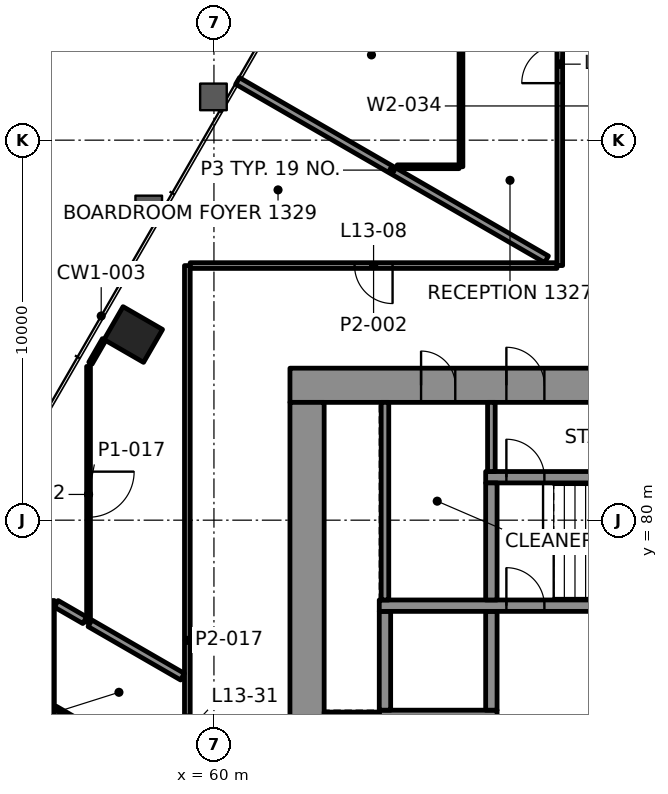
"""IFC4 building model, lengths in metres.
Left out: names, types, materials, properties, quantities, classifications, styles, units other than length and angle.
Written with IfcOpenShell. Run it as: python <this file> out.ifc"""

import sys

from ifc_helpers import new_model, si_unit, direction, frame, frame_2d, origin, origin_2d, place, context, subcontext, project, spatial, rectangle, extrude, element, fill, save


model = new_model("IFC4")
c1 = context("Model", 3, precision=1e-05, world=origin(), true_north=direction((0.0, 1.0)))
c2 = subcontext(c1, "Body", "Model", "MODEL_VIEW")
j1 = project(units=[si_unit("LENGTHUNIT", "METRE"), si_unit("PLANEANGLEUNIT", "RADIAN")], contexts=[c1])
p1 = place(None, origin())
s1 = spatial("IfcSite", under=j1, at=p1, CompositionType="ELEMENT")
p2 = place(p1, origin())
s2 = spatial("IfcBuilding", under=s1, at=p2, CompositionType="ELEMENT")
p3 = place(p2, frame((0.0, 0.0, 61.0)))
s3 = spatial("IfcBuildingStorey", under=s2, at=p3, CompositionType="ELEMENT", Elevation=61.0)
p4 = place(p3, frame((57.878, 84.885, -0.0), z_axis=(0.0, 0.0, 1.0), x_axis=(-0.5, -0.866025403784, 0.0)))
e1 = element("IfcColumn", 1, at=p4, inside=s3, PredefinedType="COLUMN", context=c2, shape_type="SweptSolid", body=[
    extrude(rectangle(XDim=1.0, YDim=1.2, at=origin_2d()), origin(), (0.0, 0.0, 1.0), 4.2),
])
p5 = place(p3, frame((62.0, 83.55, 0.0), z_axis=(0.0, 0.0, 1.0), x_axis=(1.0, 0.0, 0.0)))
e2 = element("IfcWall", 2, at=p5, inside=s3, PredefinedType="SHEAR", context=c2, shape_type="SweptSolid", body=[
    extrude(rectangle(XDim=26.0, YDim=0.9, at=frame_2d((13.0, 0.0))), origin(), (0.0, 0.0, 1.0), 4.0),
])
p6 = place(p5, frame((5.695, 0.0, 0.0)))
e3 = element("IfcOpeningElement", 3, at=p6, cuts=e2, PredefinedType="OPENING", context=c2, shape_type="SweptSolid", body=[
    extrude(rectangle(XDim=1.0, YDim=2.1, at=frame_2d((0.5, 1.05))), frame((0.0, 0.46, 0.0), z_axis=(0.0, -1.0, 0.0), x_axis=(1.0, 0.0, 0.0)), (0.0, 0.0, 1.0), 0.92),
])
p7 = place(p5, frame((19.505, 0.0, 0.0)))
e4 = element("IfcOpeningElement", 4, at=p7, cuts=e2, PredefinedType="OPENING", context=c2, shape_type="SweptSolid", body=[
    extrude(rectangle(XDim=1.0, YDim=2.1, at=frame_2d((0.5, 1.05))), frame((0.0, 0.46, 0.0), z_axis=(0.0, -1.0, 0.0), x_axis=(1.0, 0.0, 0.0)), (0.0, 0.0, 1.0), 0.92),
])
p8 = place(p5, frame((3.45, 0.0, 0.0)))
e5 = element("IfcOpeningElement", 5, at=p8, cuts=e2, PredefinedType="OPENING", context=c2, shape_type="SweptSolid", body=[
    extrude(rectangle(XDim=0.9, YDim=2.1, at=frame_2d((0.45, 1.05))), frame((0.0, 0.46, 0.0), z_axis=(0.0, -1.0, 0.0), x_axis=(1.0, 0.0, 0.0)), (0.0, 0.0, 1.0), 0.92),
])
p9 = place(p5, frame((12.65, 0.0, 0.0)))
e6 = element("IfcOpeningElement", 6, at=p9, cuts=e2, PredefinedType="OPENING", context=c2, shape_type="SweptSolid", body=[
    extrude(rectangle(XDim=0.9, YDim=2.1, at=frame_2d((0.45, 1.05))), frame((0.0, 0.46, 0.0), z_axis=(0.0, -1.0, 0.0), x_axis=(1.0, 0.0, 0.0)), (0.0, 0.0, 1.0), 0.92),
])
p10 = place(p5, frame((22.55, 0.0, 0.0)))
e7 = element("IfcOpeningElement", 7, at=p10, cuts=e2, PredefinedType="OPENING", context=c2, shape_type="SweptSolid", body=[
    extrude(rectangle(XDim=0.9, YDim=2.1, at=frame_2d((0.45, 1.05))), frame((0.0, 0.46, 0.0), z_axis=(0.0, -1.0, 0.0), x_axis=(1.0, 0.0, 0.0)), (0.0, 0.0, 1.0), 0.92),
])
p11 = place(p3, frame((62.45, 66.9, 0.0), z_axis=(0.0, 0.0, 1.0), x_axis=(0.0, 1.0, 0.0)))
e8 = element("IfcWall", 8, at=p11, inside=s3, PredefinedType="SHEAR", context=c2, shape_type="SweptSolid", body=[
    extrude(rectangle(XDim=16.2, YDim=0.9, at=frame_2d((8.1, 0.0))), origin(), (0.0, 0.0, 1.0), 4.0),
])
p12 = place(p11, frame((5.5, 0.0, 0.0)))
e9 = element("IfcOpeningElement", 9, at=p12, cuts=e8, PredefinedType="OPENING", context=c2, shape_type="SweptSolid", body=[
    extrude(rectangle(XDim=1.8, YDim=2.1, at=frame_2d((0.9, 1.05))), frame((0.0, 0.46, 0.0), z_axis=(0.0, -1.0, 0.0), x_axis=(1.0, 0.0, 0.0)), (0.0, 0.0, 1.0), 0.92),
])
p13 = place(p3, frame((64.35, 74.85, 0.0), z_axis=(0.0, 0.0, 1.0), x_axis=(1.0, 0.0, 0.0)))
e10 = element("IfcWall", 10, at=p13, inside=s3, PredefinedType="SHEAR", context=c2, shape_type="SweptSolid", body=[
    extrude(rectangle(XDim=3.1, YDim=0.3, at=frame_2d((1.55, 0.0))), origin(), (0.0, 0.0, 1.0), 4.0),
])
for number, where, z_axis, x_axis in (
    (11, (64.5, 75.0, 0.0), (0.0, 0.0, 1.0), (0.0, 1.0, 0.0)),
    (12, (67.3, 75.0, 0.0), (0.0, 0.0, 1.0), (0.0, 1.0, 0.0)),
):
    element("IfcWall", number, at=place(p3, frame(where, z_axis=z_axis, x_axis=x_axis)), inside=s3, PredefinedType="SHEAR", context=c2, shape_type="SweptSolid", body=[
        extrude(rectangle(XDim=2.6, YDim=0.3, at=frame_2d((1.3, 0.0))), origin(), (0.0, 0.0, 1.0), 4.0),
    ])
p14 = place(p3, frame((64.35, 77.75, 0.0), z_axis=(0.0, 0.0, 1.0), x_axis=(1.0, 0.0, 0.0)))
e13 = element("IfcWall", 13, at=p14, inside=s3, PredefinedType="SHEAR", context=c2, shape_type="SweptSolid", body=[
    extrude(rectangle(XDim=22.75, YDim=0.3, at=frame_2d((11.375, 0.0))), origin(), (0.0, 0.0, 1.0), 4.0),
])
p15 = place(p14, frame((3.345, 0.0, 0.0)))
e14 = element("IfcOpeningElement", 14, at=p15, cuts=e13, PredefinedType="OPENING", context=c2, shape_type="SweptSolid", body=[
    extrude(rectangle(XDim=1.0, YDim=2.1, at=frame_2d((0.5, 1.05))), frame((0.0, 0.16, 0.0), z_axis=(0.0, -1.0, 0.0), x_axis=(1.0, 0.0, 0.0)), (0.0, 0.0, 1.0), 0.32),
])
p16 = place(p3, frame((67.15, 81.13, 0.0), z_axis=(0.0, 0.0, 1.0), x_axis=(1.0, 0.0, 0.0)))
e15 = element("IfcWall", 15, at=p16, inside=s3, PredefinedType="SHEAR", context=c2, shape_type="SweptSolid", body=[
    extrude(rectangle(XDim=6.91, YDim=0.3, at=frame_2d((3.455, 0.0))), origin(), (0.0, 0.0, 1.0), 4.0),
])
p17 = place(p16, frame((0.545, 0.0, 0.0)))
e16 = element("IfcOpeningElement", 16, at=p17, cuts=e15, PredefinedType="OPENING", context=c2, shape_type="SweptSolid", body=[
    extrude(rectangle(XDim=1.0, YDim=2.1, at=frame_2d((0.5, 1.05))), frame((0.0, 0.16, 0.0), z_axis=(0.0, -1.0, 0.0), x_axis=(1.0, 0.0, 0.0)), (0.0, 0.0, 1.0), 0.32),
])
p18 = place(p3, frame((67.3, 77.9, 0.0), z_axis=(0.0, 0.0, 1.0), x_axis=(0.0, 1.0, 0.0)))
e17 = element("IfcWall", 17, at=p18, inside=s3, PredefinedType="SHEAR", context=c2, shape_type="SweptSolid", body=[
    extrude(rectangle(XDim=3.08, YDim=0.3, at=frame_2d((1.54, 0.0))), origin(), (0.0, 0.0, 1.0), 4.0),
])
p19 = place(p3, frame((69.025, 86.7, 0.0), z_axis=(0.0, 0.0, 1.0), x_axis=(-1.0, 0.0, 0.0)))
e18 = element("IfcWall", 18, at=p19, inside=s3, PredefinedType="PARTITIONING", context=c2, shape_type="SweptSolid", body=[
    extrude(rectangle(XDim=9.649, YDim=0.15, at=frame_2d((4.825, 0.0))), origin(), (0.0, 0.0, 1.0), 3.4),
])
p20 = place(p19, frame((4.325, 0.0, 0.0)))
e19 = element("IfcOpeningElement", 19, at=p20, cuts=e18, PredefinedType="OPENING", context=c2, shape_type="SweptSolid", body=[
    extrude(rectangle(XDim=1.0, YDim=2.1, at=frame_2d((0.5, 1.05))), frame((0.0, 0.085, 0.0), z_axis=(0.0, -1.0, 0.0), x_axis=(1.0, 0.0, 0.0)), (0.0, 0.0, 1.0), 0.17),
])
p21 = place(p3, frame((64.823, 89.3, 0.0), z_axis=(0.0, 0.0, 1.0), x_axis=(1.0, 0.0, 0.0)))
e20 = element("IfcWall", 20, at=p21, inside=s3, PredefinedType="PARTITIONING", context=c2, shape_type="SweptSolid", body=[
    extrude(rectangle(XDim=1.627, YDim=0.1, at=frame_2d((0.813, 0.0))), origin(), (0.0, 0.0, 1.0), 3.4),
])
p22 = place(p3, frame((56.75, 84.132, 0.0), z_axis=(0.0, 0.0, 1.0), x_axis=(0.49987987985, 0.866094744079, 0.0)))
e21 = element("IfcWall", 21, at=p22, inside=s3, PredefinedType="PARTITIONING", context=c2, shape_type="SweptSolid", body=[
    extrude(rectangle(XDim=0.716, YDim=0.1, at=frame_2d((0.358, 0.0))), origin(), (0.0, 0.0, 1.0), 3.4),
])
p23 = place(p3, frame((69.1, 86.7, 0.0), z_axis=(0.0, 0.0, 1.0), x_axis=(0.0, 1.0, 0.0)))
e22 = element("IfcWall", 22, at=p23, inside=s3, PredefinedType="PARTITIONING", context=c2, shape_type="SweptSolid", body=[
    extrude(rectangle(XDim=10.6, YDim=0.15, at=frame_2d((5.3, 0.0))), origin(), (0.0, 0.0, 1.0), 3.4),
])
p24 = place(p23, frame((4.8, 0.0, 0.0)))
e23 = element("IfcOpeningElement", 23, at=p24, cuts=e22, PredefinedType="OPENING", context=c2, shape_type="SweptSolid", body=[
    extrude(rectangle(XDim=1.0, YDim=2.1, at=frame_2d((0.5, 1.05))), frame((0.0, 0.085, 0.0), z_axis=(0.0, -1.0, 0.0), x_axis=(1.0, 0.0, 0.0)), (0.0, 0.0, 1.0), 0.17),
])
p25 = place(p3, frame((66.5, 99.899, 0.0), z_axis=(0.0, 0.0, 1.0), x_axis=(0.0, -1.0, 0.0)))
e24 = element("IfcWall", 24, at=p25, inside=s3, PredefinedType="PARTITIONING", context=c2, shape_type="SweptSolid", body=[
    extrude(rectangle(XDim=10.599, YDim=0.1, at=frame_2d((5.3, 0.0))), origin(), (0.0, 0.0, 1.0), 3.165),
])
p26 = place(p25, frame((5.062, 0.0, 0.0)))
e25 = element("IfcOpeningElement", 25, at=p26, cuts=e24, PredefinedType="OPENING", context=c2, shape_type="SweptSolid", body=[
    extrude(rectangle(XDim=1.0, YDim=2.1, at=frame_2d((0.5, 1.05))), frame((0.0, 0.06, 0.0), z_axis=(0.0, -1.0, 0.0), x_axis=(1.0, 0.0, 0.0)), (0.0, 0.0, 1.0), 0.12),
])
p27 = place(p3, frame((59.3, 66.975, 0.0), z_axis=(0.0, 0.0, 1.0), x_axis=(0.0, 1.0, 0.0)))
e26 = element("IfcWall", 26, at=p27, inside=s3, PredefinedType="PARTITIONING", context=c2, shape_type="SweptSolid", body=[
    extrude(rectangle(XDim=19.725, YDim=0.15, at=frame_2d((9.862, 0.0))), origin(), (0.0, 0.0, 1.0), 3.4),
])
p28 = place(p27, frame((1.502, 0.0, 0.0)))
e27 = element("IfcOpeningElement", 27, at=p28, cuts=e26, PredefinedType="OPENING", context=c2, shape_type="SweptSolid", body=[
    extrude(rectangle(XDim=0.9, YDim=2.1, at=frame_2d((0.45, 1.05))), frame((0.0, 0.085, 0.0), z_axis=(0.0, -1.0, 0.0), x_axis=(1.0, 0.0, 0.0)), (0.0, 0.0, 1.0), 0.17),
])
p29 = place(p27, frame((4.254, 0.0, 0.0)))
e28 = element("IfcOpeningElement", 28, at=p29, cuts=e26, PredefinedType="OPENING", context=c2, shape_type="SweptSolid", body=[
    extrude(rectangle(XDim=0.9, YDim=2.1, at=frame_2d((0.45, 1.05))), frame((0.0, 0.085, 0.0), z_axis=(0.0, -1.0, 0.0), x_axis=(1.0, 0.0, 0.0)), (0.0, 0.0, 1.0), 0.17),
])
p30 = place(p27, frame((7.007, 0.0, 0.0)))
e29 = element("IfcOpeningElement", 29, at=p30, cuts=e26, PredefinedType="OPENING", context=c2, shape_type="SweptSolid", body=[
    extrude(rectangle(XDim=0.9, YDim=2.1, at=frame_2d((0.45, 1.05))), frame((0.0, 0.085, 0.0), z_axis=(0.0, -1.0, 0.0), x_axis=(1.0, 0.0, 0.0)), (0.0, 0.0, 1.0), 0.17),
])
p31 = place(p3, frame((56.7, 84.046, 0.0), z_axis=(0.0, 0.0, 1.0), x_axis=(0.0, -1.0, 0.0)))
e30 = element("IfcWall", 30, at=p31, inside=s3, PredefinedType="PARTITIONING", context=c2, shape_type="SweptSolid", body=[
    extrude(rectangle(XDim=6.737, YDim=0.1, at=frame_2d((3.369, 0.0))), origin(), (0.0, 0.0, 1.0), 3.165),
])
p32 = place(p31, frame((2.769, 0.0, 0.0)))
e31 = element("IfcOpeningElement", 31, at=p32, cuts=e30, PredefinedType="OPENING", context=c2, shape_type="SweptSolid", body=[
    extrude(rectangle(XDim=1.2, YDim=2.1, at=frame_2d((0.6, 1.05))), frame((0.0, 0.06, 0.0), z_axis=(0.0, -1.0, 0.0), x_axis=(1.0, 0.0, 0.0)), (0.0, 0.0, 1.0), 0.12),
])
p33 = place(p3, frame((55.7, 69.63, 0.0), z_axis=(0.0, 0.0, 1.0), x_axis=(0.0, 1.0, 0.0)))
e32 = element("IfcWall", 32, at=p33, inside=s3, PredefinedType="PARTITIONING", context=c2, shape_type="SweptSolid", body=[
    extrude(rectangle(XDim=8.256, YDim=0.2, at=frame_2d((4.128, 0.0))), origin(), (0.0, 0.0, 1.0), 3.4),
])
p34 = place(p3, frame((68.751, 86.865, 0.0), z_axis=(0.0, 0.0, 1.0), x_axis=(-0.8660257632, 0.499999377474, 0.0)))
e33 = element("IfcWall", 33, at=p34, inside=s3, PredefinedType="PARTITIONING", context=c2, shape_type="SweptSolid", body=[
    extrude(rectangle(XDim=9.387, YDim=0.2, at=frame_2d((4.693, 0.0))), origin(), (0.0, 0.0, 1.0), 3.165),
])
p35 = place(p3, frame((59.173, 75.881, 0.0), z_axis=(0.0, 0.0, 1.0), x_axis=(-0.866049697453, 0.499957919771, 0.0)))
e34 = element("IfcWall", 34, at=p35, inside=s3, PredefinedType="PARTITIONING", context=c2, shape_type="SweptSolid", body=[
    extrude(rectangle(XDim=2.812, YDim=0.2, at=frame_2d((1.406, 0.0))), origin(), (0.0, 0.0, 1.0), 3.4),
])
p36 = place(p3, frame((59.199, 73.113, 0.0), z_axis=(0.0, 0.0, 1.0), x_axis=(-0.866016482536, 0.500015451737, 0.0)))
e35 = element("IfcWall", 35, at=p36, inside=s3, PredefinedType="PARTITIONING", context=c2, shape_type="SweptSolid", body=[
    extrude(rectangle(XDim=3.895, YDim=0.1, at=frame_2d((1.948, 0.0))), origin(), (0.0, 0.0, 1.0), 3.4),
])
p37 = place(p3, frame((56.6, 77.366, 0.0), z_axis=(0.0, 0.0, 1.0), x_axis=(-0.866101087359, 0.499868889286, 0.0)))
e36 = element("IfcWall", 36, at=p37, inside=s3, PredefinedType="PARTITIONING", context=c2, shape_type="SweptSolid", body=[
    extrude(rectangle(XDim=0.866, YDim=0.2, at=frame_2d((0.433, 0.0))), origin(), (0.0, 0.0, 1.0), 3.4),
])
p38 = place(p3, frame((62.9, 74.85, 0.0), z_axis=(0.0, 0.0, 1.0), x_axis=(1.0, 0.0, 0.0)))
e37 = element("IfcWall", 37, at=p38, inside=s3, PredefinedType="PARTITIONING", context=c2, shape_type="SweptSolid", body=[
    extrude(rectangle(XDim=1.45, YDim=0.2, at=frame_2d((0.725, 0.0))), origin(), (0.0, 0.0, 1.0), 4.0),
])
p39 = place(p3, frame((64.5, 77.9, 0.0), z_axis=(0.0, 0.0, 1.0), x_axis=(0.0, 1.0, 0.0)))
e38 = element("IfcWall", 38, at=p39, inside=s3, PredefinedType="PARTITIONING", context=c2, shape_type="SweptSolid", body=[
    extrude(rectangle(XDim=5.2, YDim=0.2, at=frame_2d((2.6, 0.0))), origin(), (0.0, 0.0, 1.0), 4.0),
])
p40 = place(p3, frame((67.3, 81.28, 0.0), z_axis=(0.0, 0.0, 1.0), x_axis=(0.0, 1.0, 0.0)))
e39 = element("IfcWall", 39, at=p40, inside=s3, PredefinedType="PARTITIONING", context=c2, shape_type="SweptSolid", body=[
    extrude(rectangle(XDim=1.82, YDim=0.2, at=frame_2d((0.91, 0.0))), origin(), (0.0, 0.0, 1.0), 4.0),
])
p41 = place(p20, origin())
e40 = element("IfcDoor", 40, at=p41, inside=s3, OperationType="SINGLE_SWING_LEFT", PredefinedType="DOOR", context=c2, shape_type="SweptSolid", body=[
    extrude(rectangle(XDim=1.0, YDim=2.1, at=frame_2d((0.5, 1.05))), frame((0.0, 0.025, 0.0), z_axis=(0.0, -1.0, 0.0), x_axis=(1.0, 0.0, 0.0)), (0.0, 0.0, 1.0), 0.05),
])
fill(e19, e40)
p42 = place(p24, origin())
e41 = element("IfcDoor", 41, at=p42, inside=s3, OperationType="SINGLE_SWING_RIGHT", PredefinedType="DOOR", context=c2, shape_type="SweptSolid", body=[
    extrude(rectangle(XDim=1.0, YDim=2.1, at=frame_2d((0.5, 1.05))), frame((0.0, 0.025, 0.0), z_axis=(0.0, -1.0, 0.0), x_axis=(1.0, 0.0, 0.0)), (0.0, 0.0, 1.0), 0.05),
])
fill(e23, e41)
p43 = place(p32, origin())
e42 = element("IfcDoor", 42, at=p43, inside=s3, OperationType="DOUBLE_DOOR_SINGLE_SWING", PredefinedType="DOOR", context=c2, shape_type="SweptSolid", body=[
    extrude(rectangle(XDim=1.2, YDim=2.1, at=frame_2d((0.6, 1.05))), frame((0.0, 0.025, 0.0), z_axis=(0.0, -1.0, 0.0), x_axis=(1.0, 0.0, 0.0)), (0.0, 0.0, 1.0), 0.05),
])
fill(e31, e42)
p44 = place(p15, origin())
e43 = element("IfcDoor", 43, at=p44, inside=s3, OperationType="SINGLE_SWING_LEFT", PredefinedType="DOOR", context=c2, shape_type="SweptSolid", body=[
    extrude(rectangle(XDim=1.0, YDim=2.1, at=frame_2d((0.5, 1.05))), frame((0.0, 0.025, 0.0), z_axis=(0.0, -1.0, 0.0), x_axis=(1.0, 0.0, 0.0)), (0.0, 0.0, 1.0), 0.05),
])
fill(e14, e43)
p45 = place(p17, origin())
e44 = element("IfcDoor", 44, at=p45, inside=s3, OperationType="SINGLE_SWING_RIGHT", PredefinedType="DOOR", context=c2, shape_type="SweptSolid", body=[
    extrude(rectangle(XDim=1.0, YDim=2.1, at=frame_2d((0.5, 1.05))), frame((0.0, 0.025, 0.0), z_axis=(0.0, -1.0, 0.0), x_axis=(1.0, 0.0, 0.0)), (0.0, 0.0, 1.0), 0.05),
])
fill(e16, e44)
p46 = place(p6, origin())
e45 = element("IfcDoor", 45, at=p46, inside=s3, OperationType="SINGLE_SWING_LEFT", PredefinedType="DOOR", context=c2, shape_type="SweptSolid", body=[
    extrude(rectangle(XDim=1.0, YDim=2.1, at=frame_2d((0.5, 1.05))), frame((0.0, 0.17, 0.0), z_axis=(0.0, -1.0, 0.0), x_axis=(1.0, 0.0, 0.0)), (0.0, 0.0, 1.0), 0.34),
])
fill(e3, e45)
p47 = place(p8, origin())
e46 = element("IfcDoor", 46, at=p47, inside=s3, OperationType="SINGLE_SWING_RIGHT", PredefinedType="DOOR", context=c2, shape_type="SweptSolid", body=[
    extrude(rectangle(XDim=0.9, YDim=2.1, at=frame_2d((0.45, 1.05))), frame((0.0, 0.17, 0.0), z_axis=(0.0, -1.0, 0.0), x_axis=(1.0, 0.0, 0.0)), (0.0, 0.0, 1.0), 0.34),
])
fill(e5, e46)
save(model, sys.argv[1])
